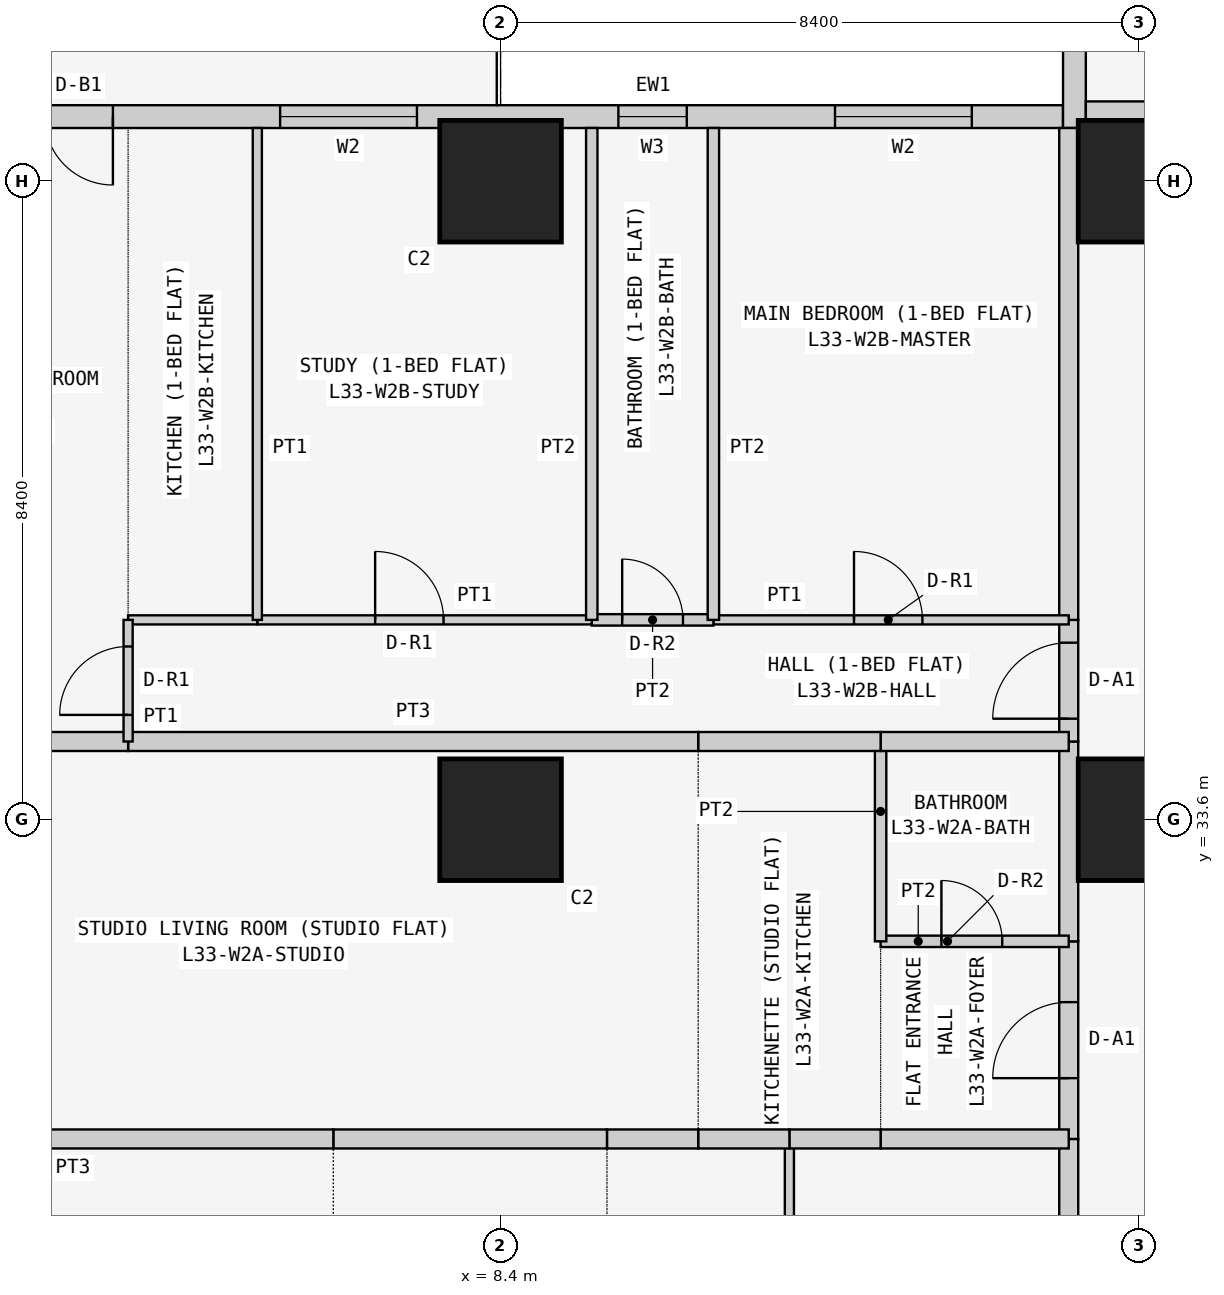
"""IFC4 building model, lengths in metres.
Left out: names, types, materials, properties, quantities, classifications, styles, units other than length and angle.
Written with IfcOpenShell. Run it as: python <this file> out.ifc"""

import sys

from ifc_helpers import new_model, si_unit, direction, frame, frame_2d, origin, origin_2d, place, context, subcontext, project, spatial, rectangle, extrude, element, fill, save


model = new_model("IFC4")
c1 = context("Model", 3, precision=1e-05, world=origin(), true_north=direction((0.0, 1.0)))
c2 = subcontext(c1, "Body", "Model", "MODEL_VIEW")
j1 = project(units=[si_unit("LENGTHUNIT", "METRE"), si_unit("PLANEANGLEUNIT", "RADIAN")], contexts=[c1])
p1 = place(None, origin())
s1 = spatial("IfcSite", under=j1, at=p1, CompositionType="ELEMENT")
p2 = place(p1, origin())
s2 = spatial("IfcBuilding", under=s1, at=p2, CompositionType="ELEMENT")
p3 = place(p2, frame((0.0, 0.0, 130.5)))
s3 = spatial("IfcBuildingStorey", under=s2, at=p3, CompositionType="ELEMENT", Elevation=130.5)
for number, where, z_axis, x_axis in (
    (1, (8.4, 33.6, 0.0), (0.0, 0.0, 1.0), (1.0, 0.0, 0.0)),
    (2, (8.4, 42.0, 0.0), (0.0, 0.0, 1.0), (1.0, 0.0, 0.0)),
    (3, (16.8, 33.6, 0.0), (0.0, 0.0, 1.0), (1.0, 0.0, 0.0)),
    (4, (16.8, 42.0, 0.0), (0.0, 0.0, 1.0), (1.0, 0.0, 0.0)),
):
    element("IfcColumn", number, at=place(p3, frame(where, z_axis=z_axis, x_axis=x_axis)), inside=s3, PredefinedType="COLUMN", context=c2, shape_type="SweptSolid", body=[
        extrude(rectangle(XDim=1.6, YDim=1.6, at=origin_2d()), origin(), (0.0, 0.0, 1.0), 3.6),
    ])
p4 = place(p3, frame((15.8, 42.85, 0.0), z_axis=(0.0, 0.0, 1.0), x_axis=(-1.0, 0.0, 0.0)))
e5 = element("IfcWall", 5, at=p4, inside=s3, PredefinedType="SOLIDWALL", context=c2, shape_type="SweptSolid", body=[
    extrude(rectangle(XDim=15.4, YDim=0.3, at=frame_2d((7.7, 0.0))), origin(), (0.0, 0.0, 1.0), 3.45),
])
p5 = place(p4, frame((1.2, 0.0, 0.9)))
e6 = element("IfcOpeningElement", 6, at=p5, cuts=e5, PredefinedType="OPENING", context=c2, shape_type="SweptSolid", body=[
    extrude(rectangle(XDim=1.8, YDim=1.5, at=frame_2d((0.9, 0.75))), frame((0.0, 0.16, 0.0), z_axis=(0.0, -1.0, 0.0), x_axis=(1.0, 0.0, 0.0)), (0.0, 0.0, 1.0), 0.32),
])
p6 = place(p4, frame((4.95, 0.0, 1.5)))
e7 = element("IfcOpeningElement", 7, at=p6, cuts=e5, PredefinedType="OPENING", context=c2, shape_type="SweptSolid", body=[
    extrude(rectangle(XDim=0.9, YDim=0.7, at=frame_2d((0.45, 0.35))), frame((0.0, 0.16, 0.0), z_axis=(0.0, -1.0, 0.0), x_axis=(1.0, 0.0, 0.0)), (0.0, 0.0, 1.0), 0.32),
])
p7 = place(p4, frame((8.5, 0.0, 0.9)))
e8 = element("IfcOpeningElement", 8, at=p7, cuts=e5, PredefinedType="OPENING", context=c2, shape_type="SweptSolid", body=[
    extrude(rectangle(XDim=1.8, YDim=1.5, at=frame_2d((0.9, 0.75))), frame((0.0, 0.16, 0.0), z_axis=(0.0, -1.0, 0.0), x_axis=(1.0, 0.0, 0.0)), (0.0, 0.0, 1.0), 0.32),
])
p8 = place(p4, frame((12.5, 0.0, 0.0)))
e9 = element("IfcOpeningElement", 9, at=p8, cuts=e5, PredefinedType="OPENING", context=c2, shape_type="SweptSolid", body=[
    extrude(rectangle(XDim=0.9, YDim=2.4, at=frame_2d((0.45, 1.2))), frame((0.0, 0.16, 0.0), z_axis=(0.0, -1.0, 0.0), x_axis=(1.0, 0.0, 0.0)), (0.0, 0.0, 1.0), 0.32),
])
p9 = place(p4, frame((13.5, 0.0, 0.9)))
e10 = element("IfcOpeningElement", 10, at=p9, cuts=e5, PredefinedType="OPENING", context=c2, shape_type="SweptSolid", body=[
    extrude(rectangle(XDim=1.2, YDim=1.5, at=frame_2d((0.6, 0.75))), frame((0.0, 0.16, 0.0), z_axis=(0.0, -1.0, 0.0), x_axis=(1.0, 0.0, 0.0)), (0.0, 0.0, 1.0), 0.32),
])
p10 = place(p3, frame((15.95, 50.0, 0.0), z_axis=(0.0, 0.0, 1.0), x_axis=(0.0, -1.0, 0.0)))
e11 = element("IfcWall", 11, at=p10, inside=s3, PredefinedType="SOLIDWALL", context=c2, shape_type="SweptSolid", body=[
    extrude(rectangle(XDim=7.3, YDim=0.3, at=frame_2d((3.65, 0.0))), origin(), (0.0, 0.0, 1.0), 3.45),
])
p11 = place(p10, frame((3.1, 0.0, 0.9)))
e12 = element("IfcOpeningElement", 12, at=p11, cuts=e11, PredefinedType="OPENING", context=c2, shape_type="SweptSolid", body=[
    extrude(rectangle(XDim=2.4, YDim=1.5, at=frame_2d((1.2, 0.75))), frame((0.0, 0.16, 0.0), z_axis=(0.0, -1.0, 0.0), x_axis=(1.0, 0.0, 0.0)), (0.0, 0.0, 1.0), 0.32),
])
p12 = place(p10, frame((0.75, 0.0, 0.9)))
e13 = element("IfcOpeningElement", 13, at=p12, cuts=e11, PredefinedType="OPENING", context=c2, shape_type="SweptSolid", body=[
    extrude(rectangle(XDim=1.2, YDim=1.5, at=frame_2d((0.6, 0.75))), frame((0.0, 0.16, 0.0), z_axis=(0.0, -1.0, 0.0), x_axis=(1.0, 0.0, 0.0)), (0.0, 0.0, 1.0), 0.32),
])
p13 = place(p3, frame((16.1, 42.925, 0.0), z_axis=(0.0, 0.0, 1.0), x_axis=(1.0, 0.0, 0.0)))
e14 = element("IfcWall", 14, at=p13, inside=s3, PredefinedType="PARTITIONING", context=c2, shape_type="SweptSolid", body=[
    extrude(rectangle(XDim=6.471, YDim=0.25, at=frame_2d((3.235, 0.0))), origin(), (0.0, 0.0, 1.0), 3.45),
])
p14 = place(p3, frame((15.875, 24.171, 0.0), z_axis=(0.0, 0.0, 1.0), x_axis=(0.0, 1.0, 0.0)))
e15 = element("IfcWall", 15, at=p14, inside=s3, PredefinedType="PARTITIONING", context=c2, shape_type="SweptSolid", body=[
    extrude(rectangle(XDim=5.229, YDim=0.25, at=frame_2d((2.615, 0.0))), origin(), (0.0, 0.0, 1.0), 3.45),
])
p15 = place(p14, frame((2.129, 0.0, 0.0)))
e16 = element("IfcOpeningElement", 16, at=p15, cuts=e15, PredefinedType="OPENING", context=c2, shape_type="SweptSolid", body=[
    extrude(rectangle(XDim=1.0, YDim=2.1, at=frame_2d((0.5, 1.05))), frame((0.0, 0.135, 0.0), z_axis=(0.0, -1.0, 0.0), x_axis=(1.0, 0.0, 0.0)), (0.0, 0.0, 1.0), 0.27),
])
p16 = place(p3, frame((15.875, 29.4, 0.0), z_axis=(0.0, 0.0, 1.0), x_axis=(0.0, 1.0, 0.0)))
e17 = element("IfcWall", 17, at=p16, inside=s3, PredefinedType="PARTITIONING", context=c2, shape_type="SweptSolid", body=[
    extrude(rectangle(XDim=2.6, YDim=0.25, at=frame_2d((1.3, 0.0))), origin(), (0.0, 0.0, 1.0), 3.45),
])
p17 = place(p16, frame((0.8, 0.0, 0.0)))
e18 = element("IfcOpeningElement", 18, at=p17, cuts=e17, PredefinedType="OPENING", context=c2, shape_type="SweptSolid", body=[
    extrude(rectangle(XDim=1.0, YDim=2.1, at=frame_2d((0.5, 1.05))), frame((0.0, 0.135, 0.0), z_axis=(0.0, -1.0, 0.0), x_axis=(1.0, 0.0, 0.0)), (0.0, 0.0, 1.0), 0.27),
])
p18 = place(p3, frame((15.875, 32.0, 0.0), z_axis=(0.0, 0.0, 1.0), x_axis=(0.0, 1.0, 0.0)))
e19 = element("IfcWall", 19, at=p18, inside=s3, PredefinedType="PARTITIONING", context=c2, shape_type="SweptSolid", body=[
    extrude(rectangle(XDim=2.629, YDim=0.25, at=frame_2d((1.314, 0.0))), origin(), (0.0, 0.0, 1.0), 3.45),
])
p19 = place(p3, frame((15.875, 34.629, 0.0), z_axis=(0.0, 0.0, 1.0), x_axis=(0.0, 1.0, 0.0)))
e20 = element("IfcWall", 20, at=p19, inside=s3, PredefinedType="PARTITIONING", context=c2, shape_type="SweptSolid", body=[
    extrude(rectangle(XDim=1.6, YDim=0.25, at=frame_2d((0.8, 0.0))), origin(), (0.0, 0.0, 1.0), 3.45),
])
p20 = place(p19, frame((0.3, 0.0, 0.0)))
e21 = element("IfcOpeningElement", 21, at=p20, cuts=e20, PredefinedType="OPENING", context=c2, shape_type="SweptSolid", body=[
    extrude(rectangle(XDim=1.0, YDim=2.1, at=frame_2d((0.5, 1.05))), frame((0.0, 0.135, 0.0), z_axis=(0.0, -1.0, 0.0), x_axis=(1.0, 0.0, 0.0)), (0.0, 0.0, 1.0), 0.27),
])
p21 = place(p3, frame((15.875, 36.229, 0.0), z_axis=(0.0, 0.0, 1.0), x_axis=(0.0, 1.0, 0.0)))
e22 = element("IfcWall", 22, at=p21, inside=s3, PredefinedType="PARTITIONING", context=c2, shape_type="SweptSolid", body=[
    extrude(rectangle(XDim=6.471, YDim=0.25, at=frame_2d((3.235, 0.0))), origin(), (0.0, 0.0, 1.0), 3.45),
])
p22 = place(p3, frame((12.2, 29.4, 0.0), z_axis=(0.0, 0.0, 1.0), x_axis=(0.0, -1.0, 0.0)))
e23 = element("IfcWall", 23, at=p22, inside=s3, PredefinedType="PARTITIONING", context=c2, shape_type="SweptSolid", body=[
    extrude(rectangle(XDim=5.229, YDim=0.12, at=frame_2d((2.615, 0.0))), origin(), (0.0, 0.0, 1.0), 3.45),
])
p23 = place(p3, frame((15.875, 29.4, 0.0), z_axis=(0.0, 0.0, 1.0), x_axis=(-1.0, 0.0, 0.0)))
e24 = element("IfcWall", 24, at=p23, inside=s3, PredefinedType="PARTITIONING", context=c2, shape_type="SweptSolid", body=[
    extrude(rectangle(XDim=2.475, YDim=0.25, at=frame_2d((1.238, 0.0))), origin(), (0.0, 0.0, 1.0), 3.45),
])
for number, where, z_axis, x_axis in (
    (25, (13.4, 29.4, 0.0), (0.0, 0.0, 1.0), (-1.0, 0.0, 0.0)),
    (26, (12.2, 29.4, 0.0), (0.0, 0.0, 1.0), (-1.0, 0.0, 0.0)),
    (27, (11.0, 29.4, 0.0), (0.0, 0.0, 1.0), (-1.0, 0.0, 0.0)),
):
    element("IfcWall", number, at=place(p3, frame(where, z_axis=z_axis, x_axis=x_axis)), inside=s3, PredefinedType="PARTITIONING", context=c2, shape_type="SweptSolid", body=[
        extrude(rectangle(XDim=1.2, YDim=0.25, at=frame_2d((0.6, 0.0))), origin(), (0.0, 0.0, 1.0), 3.45),
    ])
p24 = place(p3, frame((9.8, 29.4, 0.0), z_axis=(0.0, 0.0, 1.0), x_axis=(-1.0, 0.0, 0.0)))
e28 = element("IfcWall", 28, at=p24, inside=s3, PredefinedType="PARTITIONING", context=c2, shape_type="SweptSolid", body=[
    extrude(rectangle(XDim=3.6, YDim=0.25, at=frame_2d((1.8, 0.0))), origin(), (0.0, 0.0, 1.0), 3.45),
])
p25 = place(p3, frame((6.2, 29.4, 0.0), z_axis=(0.0, 0.0, 1.0), x_axis=(-1.0, 0.0, 0.0)))
e29 = element("IfcWall", 29, at=p25, inside=s3, PredefinedType="PARTITIONING", context=c2, shape_type="SweptSolid", body=[
    extrude(rectangle(XDim=6.85, YDim=0.25, at=frame_2d((3.425, 0.0))), origin(), (0.0, 0.0, 1.0), 3.45),
])
p26 = place(p3, frame((13.4, 32.0, 0.0), z_axis=(0.0, 0.0, 1.0), x_axis=(1.0, 0.0, 0.0)))
e30 = element("IfcWall", 30, at=p26, inside=s3, PredefinedType="PARTITIONING", context=c2, shape_type="SweptSolid", body=[
    extrude(rectangle(XDim=2.475, YDim=0.15, at=frame_2d((1.238, 0.0))), origin(), (0.0, 0.0, 1.0), 3.45),
])
p27 = place(p26, frame((0.8, 0.0, 0.0)))
e31 = element("IfcOpeningElement", 31, at=p27, cuts=e30, PredefinedType="OPENING", context=c2, shape_type="SweptSolid", body=[
    extrude(rectangle(XDim=0.8, YDim=2.1, at=frame_2d((0.4, 1.05))), frame((0.0, 0.085, 0.0), z_axis=(0.0, -1.0, 0.0), x_axis=(1.0, 0.0, 0.0)), (0.0, 0.0, 1.0), 0.17),
])
p28 = place(p3, frame((13.4, 32.0, 0.0), z_axis=(0.0, 0.0, 1.0), x_axis=(0.0, 1.0, 0.0)))
e32 = element("IfcWall", 32, at=p28, inside=s3, PredefinedType="PARTITIONING", context=c2, shape_type="SweptSolid", body=[
    extrude(rectangle(XDim=2.629, YDim=0.15, at=frame_2d((1.314, 0.0))), origin(), (0.0, 0.0, 1.0), 3.45),
])
p29 = place(p3, frame((13.4, 34.629, 0.0), z_axis=(0.0, 0.0, 1.0), x_axis=(1.0, 0.0, 0.0)))
e33 = element("IfcWall", 33, at=p29, inside=s3, PredefinedType="PARTITIONING", context=c2, shape_type="SweptSolid", body=[
    extrude(rectangle(XDim=2.475, YDim=0.25, at=frame_2d((1.238, 0.0))), origin(), (0.0, 0.0, 1.0), 3.45),
])
p30 = place(p3, frame((11.0, 34.629, 0.0), z_axis=(0.0, 0.0, 1.0), x_axis=(1.0, 0.0, 0.0)))
e34 = element("IfcWall", 34, at=p30, inside=s3, PredefinedType="PARTITIONING", context=c2, shape_type="SweptSolid", body=[
    extrude(rectangle(XDim=2.4, YDim=0.25, at=frame_2d((1.2, 0.0))), origin(), (0.0, 0.0, 1.0), 3.45),
])
p31 = place(p3, frame((3.5, 34.629, 0.0), z_axis=(0.0, 0.0, 1.0), x_axis=(1.0, 0.0, 0.0)))
e35 = element("IfcWall", 35, at=p31, inside=s3, PredefinedType="PARTITIONING", context=c2, shape_type="SweptSolid", body=[
    extrude(rectangle(XDim=7.5, YDim=0.25, at=frame_2d((3.75, 0.0))), origin(), (0.0, 0.0, 1.0), 3.45),
])
p32 = place(p3, frame((-0.65, 34.629, 0.0), z_axis=(0.0, 0.0, 1.0), x_axis=(1.0, 0.0, 0.0)))
e36 = element("IfcWall", 36, at=p32, inside=s3, PredefinedType="PARTITIONING", context=c2, shape_type="SweptSolid", body=[
    extrude(rectangle(XDim=4.15, YDim=0.25, at=frame_2d((2.075, 0.0))), origin(), (0.0, 0.0, 1.0), 3.45),
])
p33 = place(p3, frame((11.2, 36.229, 0.0), z_axis=(0.0, 0.0, 1.0), x_axis=(1.0, 0.0, 0.0)))
e37 = element("IfcWall", 37, at=p33, inside=s3, PredefinedType="PARTITIONING", context=c2, shape_type="SweptSolid", body=[
    extrude(rectangle(XDim=4.675, YDim=0.12, at=frame_2d((2.337, 0.0))), origin(), (0.0, 0.0, 1.0), 3.45),
])
p34 = place(p33, frame((1.85, 0.0, 0.0)))
e38 = element("IfcOpeningElement", 38, at=p34, cuts=e37, PredefinedType="OPENING", context=c2, shape_type="SweptSolid", body=[
    extrude(rectangle(XDim=0.9, YDim=2.1, at=frame_2d((0.45, 1.05))), frame((0.0, 0.07, 0.0), z_axis=(0.0, -1.0, 0.0), x_axis=(1.0, 0.0, 0.0)), (0.0, 0.0, 1.0), 0.14),
])
p35 = place(p3, frame((9.6, 36.229, 0.0), z_axis=(0.0, 0.0, 1.0), x_axis=(1.0, 0.0, 0.0)))
e39 = element("IfcWall", 39, at=p35, inside=s3, PredefinedType="PARTITIONING", context=c2, shape_type="SweptSolid", body=[
    extrude(rectangle(XDim=1.6, YDim=0.15, at=frame_2d((0.8, 0.0))), origin(), (0.0, 0.0, 1.0), 3.45),
])
p36 = place(p35, frame((0.4, 0.0, 0.0)))
e40 = element("IfcOpeningElement", 40, at=p36, cuts=e39, PredefinedType="OPENING", context=c2, shape_type="SweptSolid", body=[
    extrude(rectangle(XDim=0.8, YDim=2.1, at=frame_2d((0.4, 1.05))), frame((0.0, 0.085, 0.0), z_axis=(0.0, -1.0, 0.0), x_axis=(1.0, 0.0, 0.0)), (0.0, 0.0, 1.0), 0.17),
])
p37 = place(p3, frame((5.2, 36.229, 0.0), z_axis=(0.0, 0.0, 1.0), x_axis=(1.0, 0.0, 0.0)))
e41 = element("IfcWall", 41, at=p37, inside=s3, PredefinedType="PARTITIONING", context=c2, shape_type="SweptSolid", body=[
    extrude(rectangle(XDim=4.4, YDim=0.12, at=frame_2d((2.2, 0.0))), origin(), (0.0, 0.0, 1.0), 3.45),
])
p38 = place(p37, frame((1.55, 0.0, 0.0)))
e42 = element("IfcOpeningElement", 42, at=p38, cuts=e41, PredefinedType="OPENING", context=c2, shape_type="SweptSolid", body=[
    extrude(rectangle(XDim=0.9, YDim=2.1, at=frame_2d((0.45, 1.05))), frame((0.0, 0.07, 0.0), z_axis=(0.0, -1.0, 0.0), x_axis=(1.0, 0.0, 0.0)), (0.0, 0.0, 1.0), 0.14),
])
p39 = place(p3, frame((3.5, 36.229, 0.0), z_axis=(0.0, 0.0, 1.0), x_axis=(1.0, 0.0, 0.0)))
e43 = element("IfcWall", 43, at=p39, inside=s3, PredefinedType="PARTITIONING", context=c2, shape_type="SweptSolid", body=[
    extrude(rectangle(XDim=1.7, YDim=0.12, at=frame_2d((0.85, 0.0))), origin(), (0.0, 0.0, 1.0), 3.45),
])
p40 = place(p3, frame((3.5, 34.629, 0.0), z_axis=(0.0, 0.0, 1.0), x_axis=(0.0, 1.0, 0.0)))
e44 = element("IfcWall", 44, at=p40, inside=s3, PredefinedType="PARTITIONING", context=c2, shape_type="SweptSolid", body=[
    extrude(rectangle(XDim=1.6, YDim=0.12, at=frame_2d((0.8, 0.0))), origin(), (0.0, 0.0, 1.0), 3.45),
])
p41 = place(p40, frame((0.35, 0.0, 0.0)))
e45 = element("IfcOpeningElement", 45, at=p41, cuts=e44, PredefinedType="OPENING", context=c2, shape_type="SweptSolid", body=[
    extrude(rectangle(XDim=0.9, YDim=2.1, at=frame_2d((0.45, 1.05))), frame((0.0, 0.07, 0.0), z_axis=(0.0, -1.0, 0.0), x_axis=(1.0, 0.0, 0.0)), (0.0, 0.0, 1.0), 0.14),
])
for number, where, z_axis, x_axis in (
    (46, (11.2, 36.229, 0.0), (0.0, 0.0, 1.0), (0.0, 1.0, 0.0)),
    (47, (9.6, 36.229, 0.0), (0.0, 0.0, 1.0), (0.0, 1.0, 0.0)),
):
    element("IfcWall", number, at=place(p3, frame(where, z_axis=z_axis, x_axis=x_axis)), inside=s3, PredefinedType="PARTITIONING", context=c2, shape_type="SweptSolid", body=[
        extrude(rectangle(XDim=6.471, YDim=0.15, at=frame_2d((3.235, 0.0))), origin(), (0.0, 0.0, 1.0), 3.45),
    ])
p42 = place(p3, frame((5.2, 36.229, 0.0), z_axis=(0.0, 0.0, 1.0), x_axis=(0.0, 1.0, 0.0)))
e48 = element("IfcWall", 48, at=p42, inside=s3, PredefinedType="PARTITIONING", context=c2, shape_type="SweptSolid", body=[
    extrude(rectangle(XDim=6.471, YDim=0.12, at=frame_2d((3.235, 0.0))), origin(), (0.0, 0.0, 1.0), 3.45),
])
p43 = place(p5, origin())
e49 = element("IfcWindow", 49, at=p43, inside=s3, PartitioningType="SINGLE_PANEL", PredefinedType="WINDOW", context=c2, shape_type="SweptSolid", body=[
    extrude(rectangle(XDim=1.8, YDim=1.5, at=frame_2d((0.9, 0.75))), frame((0.0, 0.03, 0.0), z_axis=(0.0, -1.0, 0.0), x_axis=(1.0, 0.0, 0.0)), (0.0, 0.0, 1.0), 0.06),
])
fill(e6, e49)
p44 = place(p6, origin())
e50 = element("IfcWindow", 50, at=p44, inside=s3, PartitioningType="SINGLE_PANEL", PredefinedType="WINDOW", context=c2, shape_type="SweptSolid", body=[
    extrude(rectangle(XDim=0.9, YDim=0.7, at=frame_2d((0.45, 0.35))), frame((0.0, 0.03, 0.0), z_axis=(0.0, -1.0, 0.0), x_axis=(1.0, 0.0, 0.0)), (0.0, 0.0, 1.0), 0.06),
])
fill(e7, e50)
p45 = place(p7, origin())
e51 = element("IfcWindow", 51, at=p45, inside=s3, PartitioningType="SINGLE_PANEL", PredefinedType="WINDOW", context=c2, shape_type="SweptSolid", body=[
    extrude(rectangle(XDim=1.8, YDim=1.5, at=frame_2d((0.9, 0.75))), frame((0.0, 0.03, 0.0), z_axis=(0.0, -1.0, 0.0), x_axis=(1.0, 0.0, 0.0)), (0.0, 0.0, 1.0), 0.06),
])
fill(e8, e51)
p46 = place(p8, origin())
e52 = element("IfcDoor", 52, at=p46, inside=s3, OperationType="SINGLE_SWING_LEFT", PredefinedType="DOOR", context=c2, shape_type="SweptSolid", body=[
    extrude(rectangle(XDim=0.9, YDim=2.4, at=frame_2d((0.45, 1.2))), frame((0.0, 0.025, 0.0), z_axis=(0.0, -1.0, 0.0), x_axis=(1.0, 0.0, 0.0)), (0.0, 0.0, 1.0), 0.05),
])
fill(e9, e52)
p47 = place(p17, origin())
e53 = element("IfcDoor", 53, at=p47, inside=s3, OperationType="SINGLE_SWING_LEFT", PredefinedType="DOOR", context=c2, shape_type="SweptSolid", body=[
    extrude(rectangle(XDim=1.0, YDim=2.1, at=frame_2d((0.5, 1.05))), frame((0.0, 0.025, 0.0), z_axis=(0.0, -1.0, 0.0), x_axis=(1.0, 0.0, 0.0)), (0.0, 0.0, 1.0), 0.05),
])
fill(e18, e53)
p48 = place(p27, origin())
e54 = element("IfcDoor", 54, at=p48, inside=s3, OperationType="SINGLE_SWING_LEFT", PredefinedType="DOOR", context=c2, shape_type="SweptSolid", body=[
    extrude(rectangle(XDim=0.8, YDim=2.1, at=frame_2d((0.4, 1.05))), frame((0.0, 0.025, 0.0), z_axis=(0.0, -1.0, 0.0), x_axis=(1.0, 0.0, 0.0)), (0.0, 0.0, 1.0), 0.05),
])
fill(e31, e54)
p49 = place(p20, origin())
e55 = element("IfcDoor", 55, at=p49, inside=s3, OperationType="SINGLE_SWING_LEFT", PredefinedType="DOOR", context=c2, shape_type="SweptSolid", body=[
    extrude(rectangle(XDim=1.0, YDim=2.1, at=frame_2d((0.5, 1.05))), frame((0.0, 0.025, 0.0), z_axis=(0.0, -1.0, 0.0), x_axis=(1.0, 0.0, 0.0)), (0.0, 0.0, 1.0), 0.05),
])
fill(e21, e55)
p50 = place(p34, origin())
e56 = element("IfcDoor", 56, at=p50, inside=s3, OperationType="SINGLE_SWING_LEFT", PredefinedType="DOOR", context=c2, shape_type="SweptSolid", body=[
    extrude(rectangle(XDim=0.9, YDim=2.1, at=frame_2d((0.45, 1.05))), frame((0.0, 0.025, 0.0), z_axis=(0.0, -1.0, 0.0), x_axis=(1.0, 0.0, 0.0)), (0.0, 0.0, 1.0), 0.05),
])
fill(e38, e56)
p51 = place(p36, origin())
e57 = element("IfcDoor", 57, at=p51, inside=s3, OperationType="SINGLE_SWING_LEFT", PredefinedType="DOOR", context=c2, shape_type="SweptSolid", body=[
    extrude(rectangle(XDim=0.8, YDim=2.1, at=frame_2d((0.4, 1.05))), frame((0.0, 0.025, 0.0), z_axis=(0.0, -1.0, 0.0), x_axis=(1.0, 0.0, 0.0)), (0.0, 0.0, 1.0), 0.05),
])
fill(e40, e57)
p52 = place(p38, origin())
e58 = element("IfcDoor", 58, at=p52, inside=s3, OperationType="SINGLE_SWING_LEFT", PredefinedType="DOOR", context=c2, shape_type="SweptSolid", body=[
    extrude(rectangle(XDim=0.9, YDim=2.1, at=frame_2d((0.45, 1.05))), frame((0.0, 0.025, 0.0), z_axis=(0.0, -1.0, 0.0), x_axis=(1.0, 0.0, 0.0)), (0.0, 0.0, 1.0), 0.05),
])
fill(e42, e58)
p53 = place(p41, origin())
e59 = element("IfcDoor", 59, at=p53, inside=s3, OperationType="SINGLE_SWING_LEFT", PredefinedType="DOOR", context=c2, shape_type="SweptSolid", body=[
    extrude(rectangle(XDim=0.9, YDim=2.1, at=frame_2d((0.45, 1.05))), frame((0.0, 0.025, 0.0), z_axis=(0.0, -1.0, 0.0), x_axis=(1.0, 0.0, 0.0)), (0.0, 0.0, 1.0), 0.05),
])
fill(e45, e59)
save(model, sys.argv[1])
